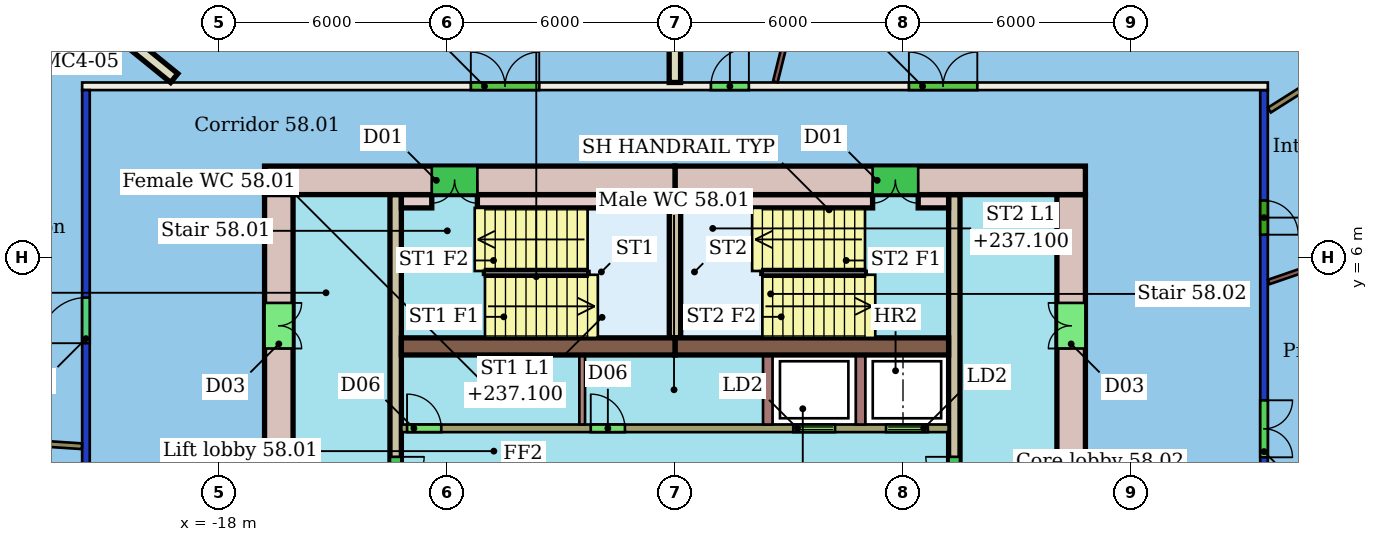
"""IFC4 building model, lengths in metres.
Left out: names, types, materials, properties, quantities, classifications, styles, units other than length and angle.
Written with IfcOpenShell. Run it as: python <this file> out.ifc"""

import sys

from ifc_helpers import new_model, si_unit, direction, frame, frame_2d, origin, place, context, subcontext, project, spatial, rectangle, extrude, element, fill, save


model = new_model("IFC4")
c1 = context("Model", 3, precision=1e-05, world=origin(), true_north=direction((0.0, 1.0)))
c2 = subcontext(c1, "Body", "Model", "MODEL_VIEW")
j1 = project(units=[si_unit("LENGTHUNIT", "METRE"), si_unit("PLANEANGLEUNIT", "RADIAN")], contexts=[c1])
p1 = place(None, origin())
s1 = spatial("IfcSite", under=j1, at=p1, CompositionType="ELEMENT")
p2 = place(p1, origin())
s2 = spatial("IfcBuilding", under=s1, at=p2, CompositionType="ELEMENT")
p3 = place(p2, frame((0.0, 0.0, 235.3)))
s3 = spatial("IfcBuildingStorey", under=s2, at=p3, CompositionType="ELEMENT", Elevation=235.3)
p4 = place(p3, frame((-21.5, -10.4, 0.0), z_axis=(0.0, 0.0, 1.0), x_axis=(0.0, 1.0, 0.0)))
e1 = element("IfcWall", 1, at=p4, inside=s3, PredefinedType="PARTITIONING", context=c2, shape_type="SweptSolid", body=[
    extrude(rectangle(XDim=20.8, YDim=0.2, at=frame_2d((10.4, 0.0))), origin(), (0.0, 0.0, 1.0), 3.05),
])
p5 = place(p4, frame((14.14, 0.0, 0.0)))
e2 = element("IfcOpeningElement", 2, at=p5, cuts=e1, PredefinedType="OPENING", context=c2, shape_type="SweptSolid", body=[
    extrude(rectangle(XDim=1.2, YDim=2.4, at=frame_2d((0.6, 1.2))), frame((0.0, 0.11, 0.0), z_axis=(0.0, -1.0, 0.0), x_axis=(1.0, 0.0, 0.0)), (0.0, 0.0, 1.0), 0.22),
])
p6 = place(p4, frame((6.51, 0.0, 0.0)))
e3 = element("IfcOpeningElement", 3, at=p6, cuts=e1, PredefinedType="OPENING", context=c2, shape_type="SweptSolid", body=[
    extrude(rectangle(XDim=1.8, YDim=2.4, at=frame_2d((0.9, 1.2))), frame((0.0, 0.11, 0.0), z_axis=(0.0, -1.0, 0.0), x_axis=(1.0, 0.0, 0.0)), (0.0, 0.0, 1.0), 0.22),
])
p7 = place(p3, frame((-21.6, 10.5, 0.0), z_axis=(0.0, 0.0, 1.0), x_axis=(1.0, 0.0, 0.0)))
e4 = element("IfcWall", 4, at=p7, inside=s3, PredefinedType="PARTITIONING", context=c2, shape_type="SweptSolid", body=[
    extrude(rectangle(XDim=31.2, YDim=0.2, at=frame_2d((15.6, 0.0))), origin(), (0.0, 0.0, 1.0), 3.45),
])
p8 = place(p7, frame((16.544, 0.0, 0.0)))
e5 = element("IfcOpeningElement", 5, at=p8, cuts=e4, PredefinedType="OPENING", context=c2, shape_type="SweptSolid", body=[
    extrude(rectangle(XDim=1.0, YDim=2.4, at=frame_2d((0.5, 1.2))), frame((0.0, 0.11, 0.0), z_axis=(0.0, -1.0, 0.0), x_axis=(1.0, 0.0, 0.0)), (0.0, 0.0, 1.0), 0.22),
])
p9 = place(p7, frame((10.228, 0.0, 0.0)))
e6 = element("IfcOpeningElement", 6, at=p9, cuts=e4, PredefinedType="OPENING", context=c2, shape_type="SweptSolid", body=[
    extrude(rectangle(XDim=1.8, YDim=2.4, at=frame_2d((0.9, 1.2))), frame((0.0, 0.11, 0.0), z_axis=(0.0, -1.0, 0.0), x_axis=(1.0, 0.0, 0.0)), (0.0, 0.0, 1.0), 0.22),
])
p10 = place(p7, frame((21.755, 0.0, 0.0)))
e7 = element("IfcOpeningElement", 7, at=p10, cuts=e4, PredefinedType="OPENING", context=c2, shape_type="SweptSolid", body=[
    extrude(rectangle(XDim=1.8, YDim=2.4, at=frame_2d((0.9, 1.2))), frame((0.0, 0.11, 0.0), z_axis=(0.0, -1.0, 0.0), x_axis=(1.0, 0.0, 0.0)), (0.0, 0.0, 1.0), 0.22),
])
p11 = place(p3, frame((9.5, 10.4, 0.0), z_axis=(0.0, 0.0, 1.0), x_axis=(0.0, -1.0, 0.0)))
e8 = element("IfcWall", 8, at=p11, inside=s3, PredefinedType="PARTITIONING", context=c2, shape_type="SweptSolid", body=[
    extrude(rectangle(XDim=20.8, YDim=0.2, at=frame_2d((10.4, 0.0))), origin(), (0.0, 0.0, 1.0), 3.05),
])
p12 = place(p11, frame((8.162, 0.0, 0.0)))
e9 = element("IfcOpeningElement", 9, at=p12, cuts=e8, PredefinedType="OPENING", context=c2, shape_type="SweptSolid", body=[
    extrude(rectangle(XDim=1.5, YDim=2.1, at=frame_2d((0.75, 1.05))), frame((0.0, 0.11, 0.0), z_axis=(0.0, -1.0, 0.0), x_axis=(1.0, 0.0, 0.0)), (0.0, 0.0, 1.0), 0.22),
])
p13 = place(p11, frame((2.906, 0.0, 0.0)))
e10 = element("IfcOpeningElement", 10, at=p13, cuts=e8, PredefinedType="OPENING", context=c2, shape_type="SweptSolid", body=[
    extrude(rectangle(XDim=0.9, YDim=2.1, at=frame_2d((0.45, 1.05))), frame((0.0, 0.11, 0.0), z_axis=(0.0, -1.0, 0.0), x_axis=(1.0, 0.0, 0.0)), (0.0, 0.0, 1.0), 0.22),
])
p14 = place(p3, frame((0.107, 24.557, 0.0), z_axis=(0.0, 0.0, 1.0), x_axis=(-0.241331862986, -0.970442647408, 0.0)))
e11 = element("IfcWall", 11, at=p14, inside=s3, PredefinedType="PARTITIONING", context=c2, shape_type="SweptSolid", body=[
    extrude(rectangle(XDim=14.366, YDim=0.125, at=frame_2d((7.183, 0.0))), origin(), (0.0, 0.0, 1.0), 3.45),
])
p15 = place(p3, frame((-6.006, 24.129, 0.0), z_axis=(0.0, 0.0, 1.0), x_axis=(0.000252643728, -0.999999968086, 0.0)))
e12 = element("IfcWall", 12, at=p15, inside=s3, PredefinedType="PARTITIONING", context=c2, shape_type="SweptSolid", body=[
    extrude(rectangle(XDim=13.529, YDim=0.3, at=frame_2d((6.764, 0.0))), origin(), (0.0, 0.0, 1.0), 3.45),
])
p16 = place(p3, frame((-22.74, 13.614, 0.0), z_axis=(0.0, 0.0, 1.0), x_axis=(0.775822828674, -0.63095082099, 0.0)))
e13 = element("IfcWall", 13, at=p16, inside=s3, PredefinedType="PARTITIONING", context=c2, shape_type="SweptSolid", body=[
    extrude(rectangle(XDim=4.592, YDim=0.3, at=frame_2d((2.296, 0.0))), origin(), (0.0, 0.0, 1.0), 3.45),
])
p17 = place(p3, frame((-28.84, 1.505, 0.0), z_axis=(0.0, 0.0, 1.0), x_axis=(0.997835523801, -0.065759162409, 0.0)))
e14 = element("IfcWall", 14, at=p17, inside=s3, PredefinedType="PARTITIONING", context=c2, shape_type="SweptSolid", body=[
    extrude(rectangle(XDim=7.251, YDim=0.15, at=frame_2d((3.625, 0.0))), origin(), (0.0, 0.0, 1.0), 3.45),
])
p18 = place(p3, frame((17.41, 8.018, 0.0), z_axis=(0.0, 0.0, 1.0), x_axis=(-0.94604778294, -0.32402714762, 0.0)))
e15 = element("IfcWall", 15, at=p18, inside=s3, PredefinedType="PARTITIONING", context=c2, shape_type="SweptSolid", body=[
    extrude(rectangle(XDim=8.234, YDim=0.125, at=frame_2d((4.117, 0.0))), origin(), (0.0, 0.0, 1.0), 3.45),
])
p19 = place(p3, frame((15.795, 13.759, 0.0), z_axis=(0.0, 0.0, 1.0), x_axis=(-0.845590904019, -0.533831455649, 0.0)))
e16 = element("IfcWall", 16, at=p19, inside=s3, PredefinedType="PARTITIONING", context=c2, shape_type="SweptSolid", body=[
    extrude(rectangle(XDim=7.279, YDim=0.15, at=frame_2d((3.64, 0.0))), origin(), (0.0, 0.0, 1.0), 3.45),
])
p20 = place(p3, frame((4.8, 8.025, 0.0), z_axis=(0.0, 0.0, 1.0), x_axis=(-1.0, 0.0, 0.0)))
e17 = element("IfcWall", 17, at=p20, inside=s3, PredefinedType="SHEAR", context=c2, shape_type="SweptSolid", body=[
    extrude(rectangle(XDim=10.8, YDim=0.75, at=frame_2d((5.4, 0.0))), origin(), (0.0, 0.0, 1.0), 3.3),
])
p21 = place(p20, frame((4.4, 0.0, 0.0)))
e18 = element("IfcOpeningElement", 18, at=p21, cuts=e17, PredefinedType="OPENING", context=c2, shape_type="SweptSolid", body=[
    extrude(rectangle(XDim=1.2, YDim=2.1, at=frame_2d((0.6, 1.05))), frame((0.0, 0.385, 0.0), z_axis=(0.0, -1.0, 0.0), x_axis=(1.0, 0.0, 0.0)), (0.0, 0.0, 1.0), 0.77),
])
p22 = place(p3, frame((-6.0, 8.025, 0.0), z_axis=(0.0, 0.0, 1.0), x_axis=(-1.0, 0.0, 0.0)))
e19 = element("IfcWall", 19, at=p22, inside=s3, PredefinedType="SHEAR", context=c2, shape_type="SweptSolid", body=[
    extrude(rectangle(XDim=10.8, YDim=0.75, at=frame_2d((5.4, 0.0))), origin(), (0.0, 0.0, 1.0), 3.3),
])
p23 = place(p22, frame((5.2, 0.0, 0.0)))
e20 = element("IfcOpeningElement", 20, at=p23, cuts=e19, PredefinedType="OPENING", context=c2, shape_type="SweptSolid", body=[
    extrude(rectangle(XDim=1.2, YDim=2.1, at=frame_2d((0.6, 1.05))), frame((0.0, 0.385, 0.0), z_axis=(0.0, -1.0, 0.0), x_axis=(1.0, 0.0, 0.0)), (0.0, 0.0, 1.0), 0.77),
])
p24 = place(p3, frame((-16.425, 7.65, 0.0), z_axis=(0.0, 0.0, 1.0), x_axis=(0.0, -1.0, 0.0)))
e21 = element("IfcWall", 21, at=p24, inside=s3, PredefinedType="SHEAR", context=c2, shape_type="SweptSolid", body=[
    extrude(rectangle(XDim=15.3, YDim=0.75, at=frame_2d((7.65, 0.0))), origin(), (0.0, 0.0, 1.0), 3.3),
])
p25 = place(p24, frame((11.25, 0.0, 0.0)))
e22 = element("IfcOpeningElement", 22, at=p25, cuts=e21, PredefinedType="OPENING", context=c2, shape_type="SweptSolid", body=[
    extrude(rectangle(XDim=1.2, YDim=2.1, at=frame_2d((0.6, 1.05))), frame((0.0, 0.385, 0.0), z_axis=(0.0, -1.0, 0.0), x_axis=(1.0, 0.0, 0.0)), (0.0, 0.0, 1.0), 0.77),
])
p26 = place(p24, frame((2.85, 0.0, 0.0)))
e23 = element("IfcOpeningElement", 23, at=p26, cuts=e21, PredefinedType="OPENING", context=c2, shape_type="SweptSolid", body=[
    extrude(rectangle(XDim=1.2, YDim=2.1, at=frame_2d((0.6, 1.05))), frame((0.0, 0.385, 0.0), z_axis=(0.0, -1.0, 0.0), x_axis=(1.0, 0.0, 0.0)), (0.0, 0.0, 1.0), 0.77),
])
p27 = place(p3, frame((4.425, -7.65, 0.0), z_axis=(0.0, 0.0, 1.0), x_axis=(0.0, 1.0, 0.0)))
e24 = element("IfcWall", 24, at=p27, inside=s3, PredefinedType="SHEAR", context=c2, shape_type="SweptSolid", body=[
    extrude(rectangle(XDim=15.3, YDim=0.75, at=frame_2d((7.65, 0.0))), origin(), (0.0, 0.0, 1.0), 3.3),
])
p28 = place(p27, frame((2.85, 0.0, 0.0)))
e25 = element("IfcOpeningElement", 25, at=p28, cuts=e24, PredefinedType="OPENING", context=c2, shape_type="SweptSolid", body=[
    extrude(rectangle(XDim=1.2, YDim=2.1, at=frame_2d((0.6, 1.05))), frame((0.0, 0.385, 0.0), z_axis=(0.0, -1.0, 0.0), x_axis=(1.0, 0.0, 0.0)), (0.0, 0.0, 1.0), 0.77),
])
p29 = place(p27, frame((11.25, 0.0, 0.0)))
e26 = element("IfcOpeningElement", 26, at=p29, cuts=e24, PredefinedType="OPENING", context=c2, shape_type="SweptSolid", body=[
    extrude(rectangle(XDim=1.2, YDim=2.1, at=frame_2d((0.6, 1.05))), frame((0.0, 0.385, 0.0), z_axis=(0.0, -1.0, 0.0), x_axis=(1.0, 0.0, 0.0)), (0.0, 0.0, 1.0), 0.77),
])
for number, where, z_axis, x_axis in (
    (27, (-13.2, 3.655, 0.0), (0.0, 0.0, 1.0), (1.0, 0.0, 0.0)),
    (28, (-6.0, 3.655, 0.0), (0.0, 0.0, 1.0), (1.0, 0.0, 0.0)),
):
    element("IfcWall", number, at=place(p3, frame(where, z_axis=z_axis, x_axis=x_axis)), inside=s3, PredefinedType="SHEAR", context=c2, shape_type="SweptSolid", body=[
        extrude(rectangle(XDim=7.2, YDim=0.45, at=frame_2d((3.6, 0.0))), origin(), (0.0, 0.0, 1.0), 3.3),
    ])
p30 = place(p3, frame((-13.35, 7.65, 0.0), z_axis=(0.0, 0.0, 1.0), x_axis=(0.0, -1.0, 0.0)))
e29 = element("IfcWall", 29, at=p30, inside=s3, PredefinedType="SHEAR", context=c2, shape_type="SweptSolid", body=[
    extrude(rectangle(XDim=15.3, YDim=0.3, at=frame_2d((7.65, 0.0))), origin(), (0.0, 0.0, 1.0), 3.3),
])
p31 = place(p30, frame((6.9, 0.0, 0.0)))
e30 = element("IfcOpeningElement", 30, at=p31, cuts=e29, PredefinedType="OPENING", context=c2, shape_type="SweptSolid", body=[
    extrude(rectangle(XDim=1.5, YDim=2.1, at=frame_2d((0.75, 1.05))), frame((0.0, 0.16, 0.0), z_axis=(0.0, -1.0, 0.0), x_axis=(1.0, 0.0, 0.0)), (0.0, 0.0, 1.0), 0.32),
])
p32 = place(p3, frame((1.35, -7.65, 0.0), z_axis=(0.0, 0.0, 1.0), x_axis=(0.0, 1.0, 0.0)))
e31 = element("IfcWall", 31, at=p32, inside=s3, PredefinedType="SHEAR", context=c2, shape_type="SweptSolid", body=[
    extrude(rectangle(XDim=15.3, YDim=0.3, at=frame_2d((7.65, 0.0))), origin(), (0.0, 0.0, 1.0), 3.3),
])
p33 = place(p32, frame((1.56, 0.0, 0.0)))
e32 = element("IfcOpeningElement", 32, at=p33, cuts=e31, PredefinedType="OPENING", context=c2, shape_type="SweptSolid", body=[
    extrude(rectangle(XDim=1.0, YDim=2.1, at=frame_2d((0.5, 1.05))), frame((0.0, 0.16, 0.0), z_axis=(0.0, -1.0, 0.0), x_axis=(1.0, 0.0, 0.0)), (0.0, 0.0, 1.0), 0.32),
])
p34 = place(p32, frame((6.9, 0.0, 0.0)))
e33 = element("IfcOpeningElement", 33, at=p34, cuts=e31, PredefinedType="OPENING", context=c2, shape_type="SweptSolid", body=[
    extrude(rectangle(XDim=1.5, YDim=2.1, at=frame_2d((0.75, 1.05))), frame((0.0, 0.16, 0.0), z_axis=(0.0, -1.0, 0.0), x_axis=(1.0, 0.0, 0.0)), (0.0, 0.0, 1.0), 0.32),
])
p35 = place(p3, frame((-13.2, 1.5, 0.0), z_axis=(0.0, 0.0, 1.0), x_axis=(1.0, 0.0, 0.0)))
e34 = element("IfcWall", 34, at=p35, inside=s3, PredefinedType="SHEAR", context=c2, shape_type="SweptSolid", body=[
    extrude(rectangle(XDim=14.4, YDim=0.2, at=frame_2d((7.2, 0.0))), origin(), (0.0, 0.0, 1.0), 3.3),
])
p36 = place(p35, frame((10.312, 0.0, 0.0)))
e35 = element("IfcOpeningElement", 35, at=p36, cuts=e34, PredefinedType="OPENING", context=c2, shape_type="SweptSolid", body=[
    extrude(rectangle(XDim=1.1, YDim=2.1, at=frame_2d((0.55, 1.05))), frame((0.0, 0.11, 0.0), z_axis=(0.0, -1.0, 0.0), x_axis=(1.0, 0.0, 0.0)), (0.0, 0.0, 1.0), 0.22),
])
p37 = place(p35, frame((12.754, 0.0, 0.0)))
e36 = element("IfcOpeningElement", 36, at=p37, cuts=e34, PredefinedType="OPENING", context=c2, shape_type="SweptSolid", body=[
    extrude(rectangle(XDim=1.1, YDim=2.1, at=frame_2d((0.55, 1.05))), frame((0.0, 0.11, 0.0), z_axis=(0.0, -1.0, 0.0), x_axis=(1.0, 0.0, 0.0)), (0.0, 0.0, 1.0), 0.22),
])
p38 = place(p35, frame((0.15, 0.0, 0.0)))
e37 = element("IfcOpeningElement", 37, at=p38, cuts=e34, PredefinedType="OPENING", context=c2, shape_type="SweptSolid", body=[
    extrude(rectangle(XDim=0.9, YDim=2.1, at=frame_2d((0.45, 1.05))), frame((0.0, 0.11, 0.0), z_axis=(0.0, -1.0, 0.0), x_axis=(1.0, 0.0, 0.0)), (0.0, 0.0, 1.0), 0.22),
])
p39 = place(p35, frame((4.983, 0.0, 0.0)))
e38 = element("IfcOpeningElement", 38, at=p39, cuts=e34, PredefinedType="OPENING", context=c2, shape_type="SweptSolid", body=[
    extrude(rectangle(XDim=0.9, YDim=2.1, at=frame_2d((0.45, 1.05))), frame((0.0, 0.11, 0.0), z_axis=(0.0, -1.0, 0.0), x_axis=(1.0, 0.0, 0.0)), (0.0, 0.0, 1.0), 0.22),
])
p40 = place(p3, frame((-6.0, 3.88, 0.0), z_axis=(0.0, 0.0, 1.0), x_axis=(0.0, 1.0, 0.0)))
e39 = element("IfcWall", 39, at=p40, inside=s3, PredefinedType="SHEAR", context=c2, shape_type="SweptSolid", body=[
    extrude(rectangle(XDim=3.77, YDim=0.3, at=frame_2d((1.885, 0.0))), origin(), (0.0, 0.0, 1.0), 3.3),
])
p41 = place(p3, frame((-13.2, 7.475, 0.0), z_axis=(0.0, 0.0, 1.0), x_axis=(1.0, 0.0, 0.0)))
e40 = element("IfcWall", 40, at=p41, inside=s3, PredefinedType="SHEAR", context=c2, shape_type="SweptSolid", body=[
    extrude(rectangle(XDim=0.8, YDim=0.35, at=frame_2d((0.4, 0.0))), origin(), (0.0, 0.0, 1.0), 3.3),
])
for number, where, z_axis, x_axis in (
    (41, (-11.2, 7.475, 0.0), (0.0, 0.0, 1.0), (1.0, 0.0, 0.0)),
    (42, (-5.85, 7.475, 0.0), (0.0, 0.0, 1.0), (1.0, 0.0, 0.0)),
):
    element("IfcWall", number, at=place(p3, frame(where, z_axis=z_axis, x_axis=x_axis)), inside=s3, PredefinedType="SHEAR", context=c2, shape_type="SweptSolid", body=[
        extrude(rectangle(XDim=5.05, YDim=0.35, at=frame_2d((2.525, 0.0))), origin(), (0.0, 0.0, 1.0), 3.3),
    ])
p42 = place(p3, frame((0.4, 7.475, 0.0), z_axis=(0.0, 0.0, 1.0), x_axis=(1.0, 0.0, 0.0)))
e43 = element("IfcWall", 43, at=p42, inside=s3, PredefinedType="SHEAR", context=c2, shape_type="SweptSolid", body=[
    extrude(rectangle(XDim=0.8, YDim=0.35, at=frame_2d((0.4, 0.0))), origin(), (0.0, 0.0, 1.0), 3.3),
])
for number, where, z_axis, x_axis in (
    (44, (-3.558, 1.6, 0.0), (0.0, 0.0, 1.0), (0.0, 1.0, 0.0)),
    (45, (-1.117, 1.6, 0.0), (0.0, 0.0, 1.0), (0.0, 1.0, 0.0)),
):
    element("IfcWall", number, at=place(p3, frame(where, z_axis=z_axis, x_axis=x_axis)), inside=s3, PredefinedType="SHEAR", context=c2, shape_type="SweptSolid", body=[
        extrude(rectangle(XDim=1.83, YDim=0.25, at=frame_2d((0.915, 0.0))), origin(), (0.0, 0.0, 1.0), 3.3),
    ])
p43 = place(p3, frame((-8.442, 1.6, 0.0), z_axis=(0.0, 0.0, 1.0), x_axis=(0.0, 1.0, 0.0)))
e46 = element("IfcWall", 46, at=p43, inside=s3, PredefinedType="PARTITIONING", context=c2, shape_type="SweptSolid", body=[
    extrude(rectangle(XDim=1.83, YDim=0.15, at=frame_2d((0.915, 0.0))), origin(), (0.0, 0.0, 1.0), 3.3),
])
p44 = place(p8, origin())
e47 = element("IfcDoor", 47, at=p44, inside=s3, OperationType="SINGLE_SWING_RIGHT", PredefinedType="DOOR", context=c2, shape_type="SweptSolid", body=[
    extrude(rectangle(XDim=1.0, YDim=2.4, at=frame_2d((0.5, 1.2))), frame((0.0, 0.025, 0.0), z_axis=(0.0, -1.0, 0.0), x_axis=(1.0, 0.0, 0.0)), (0.0, 0.0, 1.0), 0.05),
])
fill(e5, e47)
p45 = place(p9, origin())
e48 = element("IfcDoor", 48, at=p45, inside=s3, OperationType="DOUBLE_DOOR_SINGLE_SWING", PredefinedType="DOOR", context=c2, shape_type="SweptSolid", body=[
    extrude(rectangle(XDim=1.8, YDim=2.4, at=frame_2d((0.9, 1.2))), frame((0.0, 0.025, 0.0), z_axis=(0.0, -1.0, 0.0), x_axis=(1.0, 0.0, 0.0)), (0.0, 0.0, 1.0), 0.05),
])
fill(e6, e48)
p46 = place(p5, origin())
e49 = element("IfcDoor", 49, at=p46, inside=s3, OperationType="SINGLE_SWING_LEFT", PredefinedType="DOOR", context=c2, shape_type="SweptSolid", body=[
    extrude(rectangle(XDim=1.2, YDim=2.4, at=frame_2d((0.6, 1.2))), frame((0.0, 0.025, 0.0), z_axis=(0.0, -1.0, 0.0), x_axis=(1.0, 0.0, 0.0)), (0.0, 0.0, 1.0), 0.05),
])
fill(e2, e49)
p47 = place(p12, origin())
e50 = element("IfcDoor", 50, at=p47, inside=s3, OperationType="DOUBLE_DOOR_SINGLE_SWING", PredefinedType="DOOR", context=c2, shape_type="SweptSolid", body=[
    extrude(rectangle(XDim=1.5, YDim=2.1, at=frame_2d((0.75, 1.05))), frame((0.0, 0.025, 0.0), z_axis=(0.0, -1.0, 0.0), x_axis=(1.0, 0.0, 0.0)), (0.0, 0.0, 1.0), 0.05),
])
fill(e9, e50)
p48 = place(p13, origin())
e51 = element("IfcDoor", 51, at=p48, inside=s3, OperationType="SINGLE_SWING_RIGHT", PredefinedType="DOOR", context=c2, shape_type="SweptSolid", body=[
    extrude(rectangle(XDim=0.9, YDim=2.1, at=frame_2d((0.45, 1.05))), frame((0.0, 0.025, 0.0), z_axis=(0.0, -1.0, 0.0), x_axis=(1.0, 0.0, 0.0)), (0.0, 0.0, 1.0), 0.05),
])
fill(e10, e51)
p49 = place(p10, origin())
e52 = element("IfcDoor", 52, at=p49, inside=s3, OperationType="DOUBLE_DOOR_SINGLE_SWING", PredefinedType="DOOR", context=c2, shape_type="SweptSolid", body=[
    extrude(rectangle(XDim=1.8, YDim=2.4, at=frame_2d((0.9, 1.2))), frame((0.0, 0.025, 0.0), z_axis=(0.0, -1.0, 0.0), x_axis=(1.0, 0.0, 0.0)), (0.0, 0.0, 1.0), 0.05),
])
fill(e7, e52)
p50 = place(p21, origin())
e53 = element("IfcDoor", 53, at=p50, inside=s3, OperationType="DOUBLE_DOOR_SINGLE_SWING", PredefinedType="NOTDEFINED", context=c2, shape_type="SweptSolid", body=[
    extrude(rectangle(XDim=1.2, YDim=2.1, at=frame_2d((0.6, 1.05))), frame((0.0, 0.025, 0.0), z_axis=(0.0, -1.0, 0.0), x_axis=(1.0, 0.0, 0.0)), (0.0, 0.0, 1.0), 0.05),
])
fill(e18, e53)
p51 = place(p23, origin())
e54 = element("IfcDoor", 54, at=p51, inside=s3, OperationType="DOUBLE_DOOR_SINGLE_SWING", PredefinedType="NOTDEFINED", context=c2, shape_type="SweptSolid", body=[
    extrude(rectangle(XDim=1.2, YDim=2.1, at=frame_2d((0.6, 1.05))), frame((0.0, 0.025, 0.0), z_axis=(0.0, -1.0, 0.0), x_axis=(1.0, 0.0, 0.0)), (0.0, 0.0, 1.0), 0.05),
])
fill(e20, e54)
p52 = place(p26, origin())
e55 = element("IfcDoor", 55, at=p52, inside=s3, OperationType="DOUBLE_DOOR_SINGLE_SWING", PredefinedType="NOTDEFINED", context=c2, shape_type="SweptSolid", body=[
    extrude(rectangle(XDim=1.2, YDim=2.1, at=frame_2d((0.6, 1.05))), frame((0.0, 0.025, 0.0), z_axis=(0.0, -1.0, 0.0), x_axis=(1.0, 0.0, 0.0)), (0.0, 0.0, 1.0), 0.05),
])
fill(e23, e55)
p53 = place(p29, origin())
e56 = element("IfcDoor", 56, at=p53, inside=s3, OperationType="DOUBLE_DOOR_SINGLE_SWING", PredefinedType="NOTDEFINED", context=c2, shape_type="SweptSolid", body=[
    extrude(rectangle(XDim=1.2, YDim=2.1, at=frame_2d((0.6, 1.05))), frame((0.0, 0.025, 0.0), z_axis=(0.0, -1.0, 0.0), x_axis=(1.0, 0.0, 0.0)), (0.0, 0.0, 1.0), 0.05),
])
fill(e26, e56)
p54 = place(p31, origin())
e57 = element("IfcDoor", 57, at=p54, inside=s3, OperationType="DOUBLE_DOOR_SINGLE_SWING", PredefinedType="NOTDEFINED", context=c2, shape_type="SweptSolid", body=[
    extrude(rectangle(XDim=1.5, YDim=2.1, at=frame_2d((0.75, 1.05))), frame((0.0, 0.025, 0.0), z_axis=(0.0, -1.0, 0.0), x_axis=(1.0, 0.0, 0.0)), (0.0, 0.0, 1.0), 0.05),
])
fill(e30, e57)
p55 = place(p34, origin())
e58 = element("IfcDoor", 58, at=p55, inside=s3, OperationType="DOUBLE_DOOR_SINGLE_SWING", PredefinedType="NOTDEFINED", context=c2, shape_type="SweptSolid", body=[
    extrude(rectangle(XDim=1.5, YDim=2.1, at=frame_2d((0.75, 1.05))), frame((0.0, 0.025, 0.0), z_axis=(0.0, -1.0, 0.0), x_axis=(1.0, 0.0, 0.0)), (0.0, 0.0, 1.0), 0.05),
])
fill(e33, e58)
p56 = place(p36, origin())
e59 = element("IfcDoor", 59, at=p56, inside=s3, OperationType="DOUBLE_DOOR_SLIDING", PredefinedType="NOTDEFINED", context=c2, shape_type="SweptSolid", body=[
    extrude(rectangle(XDim=1.1, YDim=2.1, at=frame_2d((0.55, 1.05))), frame((0.0, 0.025, 0.0), z_axis=(0.0, -1.0, 0.0), x_axis=(1.0, 0.0, 0.0)), (0.0, 0.0, 1.0), 0.05),
])
fill(e35, e59)
p57 = place(p37, origin())
e60 = element("IfcDoor", 60, at=p57, inside=s3, OperationType="DOUBLE_DOOR_SLIDING", PredefinedType="NOTDEFINED", context=c2, shape_type="SweptSolid", body=[
    extrude(rectangle(XDim=1.1, YDim=2.1, at=frame_2d((0.55, 1.05))), frame((0.0, 0.025, 0.0), z_axis=(0.0, -1.0, 0.0), x_axis=(1.0, 0.0, 0.0)), (0.0, 0.0, 1.0), 0.05),
])
fill(e36, e60)
p58 = place(p38, origin())
e61 = element("IfcDoor", 61, at=p58, inside=s3, OperationType="SINGLE_SWING_LEFT", PredefinedType="NOTDEFINED", context=c2, shape_type="SweptSolid", body=[
    extrude(rectangle(XDim=0.9, YDim=2.1, at=frame_2d((0.45, 1.05))), frame((0.0, 0.025, 0.0), z_axis=(0.0, -1.0, 0.0), x_axis=(1.0, 0.0, 0.0)), (0.0, 0.0, 1.0), 0.05),
])
fill(e37, e61)
p59 = place(p39, origin())
e62 = element("IfcDoor", 62, at=p59, inside=s3, OperationType="SINGLE_SWING_LEFT", PredefinedType="NOTDEFINED", context=c2, shape_type="SweptSolid", body=[
    extrude(rectangle(XDim=0.9, YDim=2.1, at=frame_2d((0.45, 1.05))), frame((0.0, 0.025, 0.0), z_axis=(0.0, -1.0, 0.0), x_axis=(1.0, 0.0, 0.0)), (0.0, 0.0, 1.0), 0.05),
])
fill(e38, e62)
save(model, sys.argv[1])
